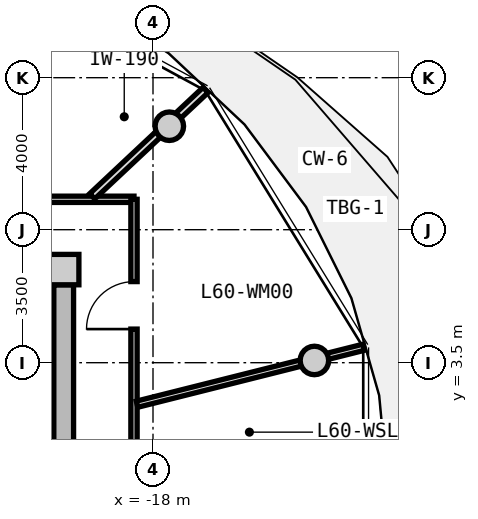
"""IFC4 building model, lengths in metres.
Left out: names, types, materials, properties, quantities, classifications, styles, units other than length and angle.
Written with IfcOpenShell. Run it as: python <this file> out.ifc"""

import sys

from ifc_helpers import new_model, si_unit, direction, frame, frame_2d, origin, origin_2d, place, context, subcontext, project, spatial, rectangle, circle, extrude, source, transform, mapped, element, fill, save


model = new_model("IFC4")
c1 = context("Model", 3, precision=1e-05, world=origin(), true_north=direction((0.0, 1.0)))
c2 = subcontext(c1, "Body", "Model", "MODEL_VIEW")
j1 = project(units=[si_unit("LENGTHUNIT", "METRE"), si_unit("PLANEANGLEUNIT", "RADIAN")], contexts=[c1])
p1 = place(None, origin())
s1 = spatial("IfcSite", under=j1, at=p1, CompositionType="ELEMENT")
p2 = place(p1, origin())
s2 = spatial("IfcBuilding", under=s1, at=p2, CompositionType="ELEMENT")
p3 = place(p2, frame((0.0, 0.0, 193.7)))
s3 = spatial("IfcBuildingStorey", under=s2, at=p3, CompositionType="ELEMENT", Elevation=193.7)
m1 = source(origin(), c2, "Body", "SweptSolid", [
    extrude(rectangle(XDim=0.8, YDim=0.8, at=origin_2d()), origin(), (0.0, 0.0, 1.0), 3.05),
])
p4 = place(p3, frame((-20.35, 5.95, 0.0), z_axis=(0.0, 0.0, 1.0), x_axis=(1.0, 0.0, 0.0)))
e1 = element("IfcColumn", 1, at=p4, inside=s3, PredefinedType="COLUMN", context=c2, shape_type="MappedRepresentation", body=[
    mapped(m1, transform((0.0, 0.0, 0.0), x_axis=(1.0, 0.0, 0.0), y_axis=(0.0, 1.0, 0.0), z_axis=(0.0, 0.0, 1.0), scale=1.0)),
])
m2 = source(origin(), c2, "Body", "SweptSolid", [
    extrude(rectangle(XDim=11.1, YDim=0.52, at=frame_2d((5.55, 0.0))), origin(), (0.0, 0.0, 1.0), 2.81),
])
p5 = place(p3, frame((-20.35, 5.55, 0.0), z_axis=(0.0, 0.0, 1.0), x_axis=(0.0, -1.0, 0.0)))
e2 = element("IfcWall", 2, at=p5, inside=s3, PredefinedType="SHEAR", context=c2, shape_type="MappedRepresentation", body=[
    mapped(m2, transform((0.0, 0.0, 0.0), x_axis=(1.0, 0.0, 0.0), y_axis=(0.0, 1.0, 0.0), z_axis=(0.0, 0.0, 1.0), scale=1.0)),
])
p6 = place(p5, frame((5.65, 0.0, 0.0)))
e3 = element("IfcOpeningElement", 3, at=p6, cuts=e2, PredefinedType="OPENING", context=c2, shape_type="SweptSolid", body=[
    extrude(rectangle(XDim=1.2, YDim=2.15, at=frame_2d((0.6, 1.075))), frame((0.0, 0.27, 0.0), z_axis=(0.0, -1.0, 0.0), x_axis=(1.0, 0.0, 0.0)), (0.0, 0.0, 1.0), 0.54),
])
m3 = source(origin(), c2, "Body", "SweptSolid", [
    extrude(circle(Radius=0.375, at=origin_2d()), origin(), (0.0, 0.0, 1.0), 3.05),
])
for number, where, z_axis, x_axis in (
    (4, (-13.753, 3.559, 0.0), (0.0, 0.0, 1.0), (1.0, 0.0, 0.0)),
    (5, (-17.57, 9.723, 0.0), (0.0, 0.0, 1.0), (1.0, 0.0, 0.0)),
):
    element("IfcColumn", number, at=place(p3, frame(where, z_axis=z_axis, x_axis=x_axis)), inside=s3, PredefinedType="COLUMN", context=c2, shape_type="MappedRepresentation", body=[
        mapped(m3, transform((0.0, 0.0, 0.0), x_axis=(1.0, 0.0, 0.0), y_axis=(0.0, 1.0, 0.0), z_axis=(0.0, 0.0, 1.0), scale=1.0)),
    ])
m4 = source(origin(), c2, "Body", "SweptSolid", [
    extrude(rectangle(XDim=8.58, YDim=0.165, at=frame_2d((4.29, 0.0))), origin(), (0.0, 0.0, 1.0), 2.795),
])
p7 = place(p3, frame((-27.08, 7.8, 0.0), z_axis=(0.0, 0.0, 1.0), x_axis=(1.0, 0.0, 0.0)))
e6 = element("IfcWall", 6, at=p7, inside=s3, PredefinedType="PARTITIONING", context=c2, shape_type="MappedRepresentation", body=[
    mapped(m4, transform((0.0, 0.0, 0.0), x_axis=(1.0, 0.0, 0.0), y_axis=(0.0, 1.0, 0.0), z_axis=(0.0, 0.0, 1.0), scale=1.0)),
])
p8 = place(p7, frame((3.802, 0.0, 0.0)))
e7 = element("IfcOpeningElement", 7, at=p8, cuts=e6, PredefinedType="OPENING", context=c2, shape_type="SweptSolid", body=[
    extrude(rectangle(XDim=1.25, YDim=2.2, at=frame_2d((0.625, 1.1))), frame((0.0, 0.093, 0.0), z_axis=(0.0, -1.0, 0.0), x_axis=(1.0, 0.0, 0.0)), (0.0, 0.0, 1.0), 0.185),
])
m5 = source(origin(), c2, "Body", "SweptSolid", [
    extrude(rectangle(XDim=6.88, YDim=0.165, at=frame_2d((3.44, 0.0))), origin(), (0.0, 0.0, 1.0), 2.795),
])
p9 = place(p3, frame((-18.5, 7.8, 0.0), z_axis=(0.0, 0.0, 1.0), x_axis=(0.0, -1.0, 0.0)))
e8 = element("IfcWall", 8, at=p9, inside=s3, PredefinedType="PARTITIONING", context=c2, shape_type="MappedRepresentation", body=[
    mapped(m5, transform((0.0, 0.0, 0.0), x_axis=(1.0, 0.0, 0.0), y_axis=(0.0, 1.0, 0.0), z_axis=(0.0, 0.0, 1.0), scale=1.0)),
])
p10 = place(p9, frame((2.166, 0.0, 0.0)))
e9 = element("IfcOpeningElement", 9, at=p10, cuts=e8, PredefinedType="OPENING", context=c2, shape_type="SweptSolid", body=[
    extrude(rectangle(XDim=1.25, YDim=2.2, at=frame_2d((0.625, 1.1))), frame((0.0, 0.093, 0.0), z_axis=(0.0, -1.0, 0.0), x_axis=(1.0, 0.0, 0.0)), (0.0, 0.0, 1.0), 0.185),
])
m6 = source(origin(), c2, "Body", "SweptSolid", [
    extrude(rectangle(XDim=6.157, YDim=0.165, at=frame_2d((3.079, 0.0))), origin(), (0.0, 0.0, 1.0), 2.395),
])
p11 = place(p3, frame((-18.42, 2.407, 0.0), z_axis=(0.0, 0.0, 1.0), x_axis=(0.969840867184, 0.243738984038, 0.0)))
e10 = element("IfcWall", 10, at=p11, inside=s3, PredefinedType="PARTITIONING", context=c2, shape_type="MappedRepresentation", body=[
    mapped(m6, transform((0.0, 0.0, 0.0), x_axis=(1.0, 0.0, 0.0), y_axis=(0.0, 1.0, 0.0), z_axis=(0.0, 0.0, 1.0), scale=1.0)),
])
m7 = source(origin(), c2, "Body", "SweptSolid", [
    extrude(rectangle(XDim=4.089, YDim=0.19, at=frame_2d((2.044, 0.0))), origin(), (0.0, 0.0, 1.0), 2.395),
])
p12 = place(p3, frame((-19.598, 7.88, 0.0), z_axis=(0.0, 0.0, 1.0), x_axis=(0.729401273609, 0.684086092577, 0.0)))
e11 = element("IfcWall", 11, at=p12, inside=s3, PredefinedType="PARTITIONING", context=c2, shape_type="MappedRepresentation", body=[
    mapped(m7, transform((0.0, 0.0, 0.0), x_axis=(1.0, 0.0, 0.0), y_axis=(0.0, 1.0, 0.0), z_axis=(0.0, 0.0, 1.0), scale=1.0)),
])
m8 = source(origin(), c2, "Body", "SweptSolid", [
    extrude(rectangle(XDim=1.25, YDim=2.2, at=frame_2d((0.625, 1.1))), frame((0.0, 0.025, 0.0), z_axis=(0.0, -1.0, 0.0), x_axis=(1.0, 0.0, 0.0)), (0.0, 0.0, 1.0), 0.05),
])
p13 = place(p10, frame((1.25, 0.0, 0.0), z_axis=(0.0, 0.0, 1.0), x_axis=(-1.0, 0.0, 0.0)))
e12 = element("IfcDoor", 12, at=p13, inside=s3, OperationType="SINGLE_SWING_LEFT", PredefinedType="DOOR", context=c2, shape_type="MappedRepresentation", body=[
    mapped(m8, transform((0.0, 0.0, 0.0), x_axis=(1.0, 0.0, 0.0), y_axis=(0.0, 1.0, 0.0), z_axis=(0.0, 0.0, 1.0), scale=1.0)),
])
fill(e9, e12)
save(model, sys.argv[1])
